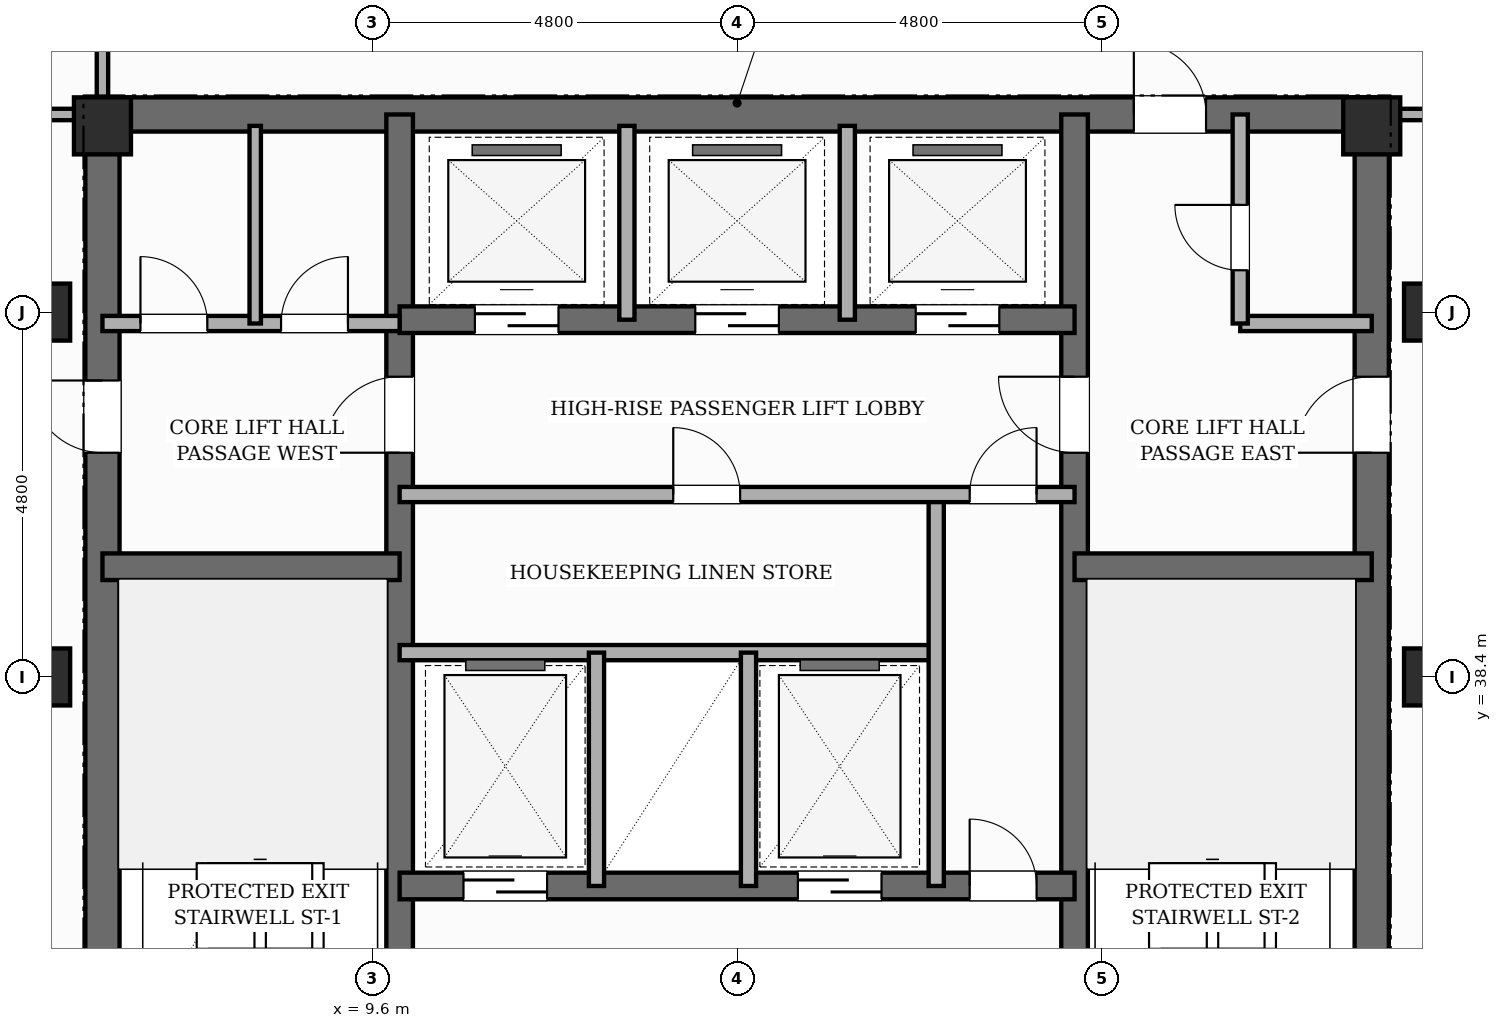
"""IFC4 building model, lengths in metres.
Left out: names, types, materials, properties, quantities, classifications, styles, units other than length and angle.
Written with IfcOpenShell. Run it as: python <this file> out.ifc"""

import sys

from ifc_helpers import new_model, si_unit, direction, frame, frame_2d, origin, origin_2d, place, context, subcontext, project, spatial, rectangle, extrude, element, fill, save


model = new_model("IFC4")
c1 = context("Model", 3, precision=1e-05, world=origin(), true_north=direction((0.0, 1.0)))
c2 = subcontext(c1, "Body", "Model", "MODEL_VIEW")
j1 = project(units=[si_unit("LENGTHUNIT", "METRE"), si_unit("PLANEANGLEUNIT", "RADIAN")], contexts=[c1])
p1 = place(None, origin())
s1 = spatial("IfcSite", under=j1, at=p1, CompositionType="ELEMENT")
p2 = place(p1, origin())
s2 = spatial("IfcBuilding", under=s1, at=p2, CompositionType="ELEMENT")
p3 = place(p2, frame((0.0, 0.0, 265.6)))
s3 = spatial("IfcBuildingStorey", under=s2, at=p3, CompositionType="ELEMENT", Elevation=265.6)
p4 = place(p3, frame((6.05, 30.675, 0.0), z_axis=(0.0, 0.0, 1.0), x_axis=(0.0, 1.0, 0.0)))
e1 = element("IfcWall", 1, at=p4, inside=s3, PredefinedType="SHEAR", context=c2, shape_type="SweptSolid", body=[
    extrude(rectangle(XDim=15.35, YDim=0.45, at=frame_2d((7.675, 0.0))), origin(), (0.0, 0.0, 1.0), 4.3),
])
p5 = place(p4, frame((10.675, 0.0, 0.0)))
e2 = element("IfcOpeningElement", 2, at=p5, cuts=e1, PredefinedType="OPENING", context=c2, shape_type="SweptSolid", body=[
    extrude(rectangle(XDim=0.95, YDim=2.15, at=frame_2d((0.475, 1.075))), frame((0.0, 0.235, 0.0), z_axis=(0.0, -1.0, 0.0), x_axis=(1.0, 0.0, 0.0)), (0.0, 0.0, 1.0), 0.47),
])
p6 = place(p3, frame((22.75, 30.675, 0.0), z_axis=(0.0, 0.0, 1.0), x_axis=(0.0, 1.0, 0.0)))
e3 = element("IfcWall", 3, at=p6, inside=s3, PredefinedType="SHEAR", context=c2, shape_type="SweptSolid", body=[
    extrude(rectangle(XDim=15.35, YDim=0.45, at=frame_2d((7.675, 0.0))), origin(), (0.0, 0.0, 1.0), 4.3),
])
p7 = place(p6, frame((10.675, 0.0, 0.0)))
e4 = element("IfcOpeningElement", 4, at=p7, cuts=e3, PredefinedType="OPENING", context=c2, shape_type="SweptSolid", body=[
    extrude(rectangle(XDim=1.0, YDim=2.15, at=frame_2d((0.5, 1.075))), frame((0.0, 0.235, 0.0), z_axis=(0.0, -1.0, 0.0), x_axis=(1.0, 0.0, 0.0)), (0.0, 0.0, 1.0), 0.47),
])
p8 = place(p3, frame((6.05, 45.8, 0.0), z_axis=(0.0, 0.0, 1.0), x_axis=(1.0, 0.0, 0.0)))
e5 = element("IfcWall", 5, at=p8, inside=s3, PredefinedType="SHEAR", context=c2, shape_type="SweptSolid", body=[
    extrude(rectangle(XDim=16.7, YDim=0.45, at=frame_2d((8.35, 0.0))), origin(), (0.0, 0.0, 1.0), 4.3),
])
p9 = place(p8, frame((13.57, 0.0, 0.0)))
e6 = element("IfcOpeningElement", 6, at=p9, cuts=e5, PredefinedType="OPENING", context=c2, shape_type="SweptSolid", body=[
    extrude(rectangle(XDim=0.95, YDim=2.15, at=frame_2d((0.475, 1.075))), frame((0.0, 0.235, 0.0), z_axis=(0.0, -1.0, 0.0), x_axis=(1.0, 0.0, 0.0)), (0.0, 0.0, 1.0), 0.47),
])
p10 = place(p3, frame((9.96, 30.9, 0.0), z_axis=(0.0, 0.0, 1.0), x_axis=(0.0, 1.0, 0.0)))
e7 = element("IfcWall", 7, at=p10, inside=s3, PredefinedType="SHEAR", context=c2, shape_type="SweptSolid", body=[
    extrude(rectangle(XDim=14.9, YDim=0.35, at=frame_2d((7.45, 0.0))), origin(), (0.0, 0.0, 1.0), 4.3),
])
p11 = place(p10, frame((0.65, 0.0, 0.0)))
e8 = element("IfcOpeningElement", 8, at=p11, cuts=e7, PredefinedType="OPENING", context=c2, shape_type="SweptSolid", body=[
    extrude(rectangle(XDim=0.95, YDim=2.1, at=frame_2d((0.475, 1.05))), frame((0.0, 0.185, 0.0), z_axis=(0.0, -1.0, 0.0), x_axis=(1.0, 0.0, 0.0)), (0.0, 0.0, 1.0), 0.37),
])
p12 = place(p10, frame((10.45, 0.0, 0.0)))
e9 = element("IfcOpeningElement", 9, at=p12, cuts=e7, PredefinedType="OPENING", context=c2, shape_type="SweptSolid", body=[
    extrude(rectangle(XDim=1.0, YDim=2.15, at=frame_2d((0.5, 1.075))), frame((0.0, 0.185, 0.0), z_axis=(0.0, -1.0, 0.0), x_axis=(1.0, 0.0, 0.0)), (0.0, 0.0, 1.0), 0.37),
])
p13 = place(p3, frame((18.84, 30.9, 0.0), z_axis=(0.0, 0.0, 1.0), x_axis=(0.0, 1.0, 0.0)))
e10 = element("IfcWall", 10, at=p13, inside=s3, PredefinedType="SHEAR", context=c2, shape_type="SweptSolid", body=[
    extrude(rectangle(XDim=14.9, YDim=0.35, at=frame_2d((7.45, 0.0))), origin(), (0.0, 0.0, 1.0), 4.3),
])
p14 = place(p13, frame((0.65, 0.0, 0.0)))
e11 = element("IfcOpeningElement", 11, at=p14, cuts=e10, PredefinedType="OPENING", context=c2, shape_type="SweptSolid", body=[
    extrude(rectangle(XDim=0.95, YDim=2.1, at=frame_2d((0.475, 1.05))), frame((0.0, 0.185, 0.0), z_axis=(0.0, -1.0, 0.0), x_axis=(1.0, 0.0, 0.0)), (0.0, 0.0, 1.0), 0.37),
])
p15 = place(p13, frame((10.45, 0.0, 0.0)))
e12 = element("IfcOpeningElement", 12, at=p15, cuts=e10, PredefinedType="OPENING", context=c2, shape_type="SweptSolid", body=[
    extrude(rectangle(XDim=1.0, YDim=2.15, at=frame_2d((0.5, 1.075))), frame((0.0, 0.185, 0.0), z_axis=(0.0, -1.0, 0.0), x_axis=(1.0, 0.0, 0.0)), (0.0, 0.0, 1.0), 0.37),
])
for number, where, z_axis, x_axis in (
    (13, (6.05, 39.85, 0.0), (0.0, 0.0, 1.0), (1.0, 0.0, 0.0)),
    (14, (18.84, 39.85, 0.0), (0.0, 0.0, 1.0), (1.0, 0.0, 0.0)),
):
    element("IfcWall", number, at=place(p3, frame(where, z_axis=z_axis, x_axis=x_axis)), inside=s3, PredefinedType="SHEAR", context=c2, shape_type="SweptSolid", body=[
        extrude(rectangle(XDim=3.91, YDim=0.35, at=frame_2d((1.955, 0.0))), origin(), (0.0, 0.0, 1.0), 4.3),
    ])
p16 = place(p3, frame((9.96, 35.65, 0.0), z_axis=(0.0, 0.0, 1.0), x_axis=(1.0, 0.0, 0.0)))
e15 = element("IfcWall", 15, at=p16, inside=s3, PredefinedType="SHEAR", context=c2, shape_type="SweptSolid", body=[
    extrude(rectangle(XDim=8.88, YDim=0.35, at=frame_2d((4.44, 0.0))), origin(), (0.0, 0.0, 1.0), 4.3),
])
p17 = place(p16, frame((0.84, 0.0, 0.0)))
e16 = element("IfcOpeningElement", 16, at=p17, cuts=e15, PredefinedType="OPENING", context=c2, shape_type="SweptSolid", body=[
    extrude(rectangle(XDim=1.1, YDim=2.15, at=frame_2d((0.55, 1.075))), frame((0.0, 0.185, 0.0), z_axis=(0.0, -1.0, 0.0), x_axis=(1.0, 0.0, 0.0)), (0.0, 0.0, 1.0), 0.37),
])
p18 = place(p16, frame((5.24, 0.0, 0.0)))
e17 = element("IfcOpeningElement", 17, at=p18, cuts=e15, PredefinedType="OPENING", context=c2, shape_type="SweptSolid", body=[
    extrude(rectangle(XDim=1.1, YDim=2.15, at=frame_2d((0.55, 1.075))), frame((0.0, 0.185, 0.0), z_axis=(0.0, -1.0, 0.0), x_axis=(1.0, 0.0, 0.0)), (0.0, 0.0, 1.0), 0.37),
])
p19 = place(p16, frame((7.5, 0.0, 0.0)))
e18 = element("IfcOpeningElement", 18, at=p19, cuts=e15, PredefinedType="OPENING", context=c2, shape_type="SweptSolid", body=[
    extrude(rectangle(XDim=0.88, YDim=2.1, at=frame_2d((0.44, 1.05))), frame((0.0, 0.185, 0.0), z_axis=(0.0, -1.0, 0.0), x_axis=(1.0, 0.0, 0.0)), (0.0, 0.0, 1.0), 0.37),
])
p20 = place(p3, frame((9.96, 43.1, 0.0), z_axis=(0.0, 0.0, 1.0), x_axis=(1.0, 0.0, 0.0)))
e19 = element("IfcWall", 19, at=p20, inside=s3, PredefinedType="SHEAR", context=c2, shape_type="SweptSolid", body=[
    extrude(rectangle(XDim=8.88, YDim=0.35, at=frame_2d((4.44, 0.0))), origin(), (0.0, 0.0, 1.0), 4.3),
])
p21 = place(p20, frame((0.99, 0.0, 0.0)))
e20 = element("IfcOpeningElement", 20, at=p21, cuts=e19, PredefinedType="OPENING", context=c2, shape_type="SweptSolid", body=[
    extrude(rectangle(XDim=1.1, YDim=2.15, at=frame_2d((0.55, 1.075))), frame((0.0, 0.185, 0.0), z_axis=(0.0, -1.0, 0.0), x_axis=(1.0, 0.0, 0.0)), (0.0, 0.0, 1.0), 0.37),
])
p22 = place(p20, frame((3.89, 0.0, 0.0)))
e21 = element("IfcOpeningElement", 21, at=p22, cuts=e19, PredefinedType="OPENING", context=c2, shape_type="SweptSolid", body=[
    extrude(rectangle(XDim=1.1, YDim=2.15, at=frame_2d((0.55, 1.075))), frame((0.0, 0.185, 0.0), z_axis=(0.0, -1.0, 0.0), x_axis=(1.0, 0.0, 0.0)), (0.0, 0.0, 1.0), 0.37),
])
p23 = place(p20, frame((6.79, 0.0, 0.0)))
e22 = element("IfcOpeningElement", 22, at=p23, cuts=e19, PredefinedType="OPENING", context=c2, shape_type="SweptSolid", body=[
    extrude(rectangle(XDim=1.1, YDim=2.15, at=frame_2d((0.55, 1.075))), frame((0.0, 0.185, 0.0), z_axis=(0.0, -1.0, 0.0), x_axis=(1.0, 0.0, 0.0)), (0.0, 0.0, 1.0), 0.37),
])
for number, where, z_axis, x_axis in (
    (23, (5.25, 38.4, 0.0), (0.0, 0.0, 1.0), (1.0, 0.0, 0.0)),
    (24, (5.25, 43.2, 0.0), (0.0, 0.0, 1.0), (1.0, 0.0, 0.0)),
    (25, (6.05, 45.65, 0.0), (0.0, 0.0, 1.0), (1.0, 0.0, 0.0)),
    (26, (22.75, 45.65, 0.0), (0.0, 0.0, 1.0), (1.0, 0.0, 0.0)),
    (27, (23.55, 38.4, 0.0), (0.0, 0.0, 1.0), (1.0, 0.0, 0.0)),
    (28, (23.55, 43.2, 0.0), (0.0, 0.0, 1.0), (1.0, 0.0, 0.0)),
):
    element("IfcColumn", number, at=place(p3, frame(where, z_axis=z_axis, x_axis=x_axis)), inside=s3, PredefinedType="COLUMN", context=c2, shape_type="SweptSolid", body=[
        extrude(rectangle(XDim=0.75, YDim=0.75, at=origin_2d()), origin(), (0.0, 0.0, 1.0), 4.3),
    ])
p24 = place(p3, frame((9.96, 38.72, 0.0), z_axis=(0.0, 0.0, 1.0), x_axis=(1.0, 0.0, 0.0)))
e29 = element("IfcWall", 29, at=p24, inside=s3, PredefinedType="POLYGONAL", context=c2, shape_type="SweptSolid", body=[
    extrude(rectangle(XDim=7.06, YDim=0.2, at=frame_2d((3.53, 0.0))), origin(), (0.0, 0.0, 1.0), 4.04),
])
for number, where, z_axis, x_axis in (
    (30, (12.55, 35.65, 0.0), (0.0, 0.0, 1.0), (0.0, 1.0, 0.0)),
    (31, (14.55, 35.65, 0.0), (0.0, 0.0, 1.0), (0.0, 1.0, 0.0)),
):
    element("IfcWall", number, at=place(p3, frame(where, z_axis=z_axis, x_axis=x_axis)), inside=s3, PredefinedType="POLYGONAL", context=c2, shape_type="SweptSolid", body=[
        extrude(rectangle(XDim=3.07, YDim=0.2, at=frame_2d((1.535, 0.0))), origin(), (0.0, 0.0, 1.0), 4.04),
    ])
p25 = place(p3, frame((17.02, 35.65, 0.0), z_axis=(0.0, 0.0, 1.0), x_axis=(0.0, 1.0, 0.0)))
e32 = element("IfcWall", 32, at=p25, inside=s3, PredefinedType="POLYGONAL", context=c2, shape_type="SweptSolid", body=[
    extrude(rectangle(XDim=5.15, YDim=0.2, at=frame_2d((2.575, 0.0))), origin(), (0.0, 0.0, 1.0), 4.04),
])
p26 = place(p3, frame((9.96, 40.8, 0.0), z_axis=(0.0, 0.0, 1.0), x_axis=(1.0, 0.0, 0.0)))
e33 = element("IfcWall", 33, at=p26, inside=s3, PredefinedType="POLYGONAL", context=c2, shape_type="SweptSolid", body=[
    extrude(rectangle(XDim=8.88, YDim=0.2, at=frame_2d((4.44, 0.0))), origin(), (0.0, 0.0, 1.0), 4.04),
])
p27 = place(p26, frame((7.5, 0.0, 0.0)))
e34 = element("IfcOpeningElement", 34, at=p27, cuts=e33, PredefinedType="OPENING", context=c2, shape_type="SweptSolid", body=[
    extrude(rectangle(XDim=0.88, YDim=2.1, at=frame_2d((0.44, 1.05))), frame((0.0, 0.11, 0.0), z_axis=(0.0, -1.0, 0.0), x_axis=(1.0, 0.0, 0.0)), (0.0, 0.0, 1.0), 0.22),
])
p28 = place(p26, frame((3.6, 0.0, 0.0)))
e35 = element("IfcOpeningElement", 35, at=p28, cuts=e33, PredefinedType="OPENING", context=c2, shape_type="SweptSolid", body=[
    extrude(rectangle(XDim=0.88, YDim=2.1, at=frame_2d((0.44, 1.05))), frame((0.0, 0.11, 0.0), z_axis=(0.0, -1.0, 0.0), x_axis=(1.0, 0.0, 0.0)), (0.0, 0.0, 1.0), 0.22),
])
p29 = place(p3, frame((21.02, 43.05, 0.0), z_axis=(0.0, 0.0, 1.0), x_axis=(1.0, 0.0, 0.0)))
e36 = element("IfcWall", 36, at=p29, inside=s3, PredefinedType="POLYGONAL", context=c2, shape_type="SweptSolid", body=[
    extrude(rectangle(XDim=1.73, YDim=0.2, at=frame_2d((0.865, 0.0))), origin(), (0.0, 0.0, 1.0), 3.32),
])
p30 = place(p3, frame((21.02, 43.05, 0.0), z_axis=(0.0, 0.0, 1.0), x_axis=(0.0, 1.0, 0.0)))
e37 = element("IfcWall", 37, at=p30, inside=s3, PredefinedType="POLYGONAL", context=c2, shape_type="SweptSolid", body=[
    extrude(rectangle(XDim=2.75, YDim=0.2, at=frame_2d((1.375, 0.0))), origin(), (0.0, 0.0, 1.0), 4.04),
])
p31 = place(p30, frame((0.7, 0.0, 0.0)))
e38 = element("IfcOpeningElement", 38, at=p31, cuts=e37, PredefinedType="OPENING", context=c2, shape_type="SweptSolid", body=[
    extrude(rectangle(XDim=0.86, YDim=2.1, at=frame_2d((0.43, 1.05))), frame((0.0, 0.11, 0.0), z_axis=(0.0, -1.0, 0.0), x_axis=(1.0, 0.0, 0.0)), (0.0, 0.0, 1.0), 0.22),
])
p32 = place(p3, frame((6.05, 43.05, 0.0), z_axis=(0.0, 0.0, 1.0), x_axis=(1.0, 0.0, 0.0)))
e39 = element("IfcWall", 39, at=p32, inside=s3, PredefinedType="POLYGONAL", context=c2, shape_type="SweptSolid", body=[
    extrude(rectangle(XDim=3.91, YDim=0.2, at=frame_2d((1.955, 0.0))), origin(), (0.0, 0.0, 1.0), 3.32),
])
p33 = place(p32, frame((0.5, 0.0, 0.0)))
e40 = element("IfcOpeningElement", 40, at=p33, cuts=e39, PredefinedType="OPENING", context=c2, shape_type="SweptSolid", body=[
    extrude(rectangle(XDim=0.88, YDim=2.1, at=frame_2d((0.44, 1.05))), frame((0.0, 0.11, 0.0), z_axis=(0.0, -1.0, 0.0), x_axis=(1.0, 0.0, 0.0)), (0.0, 0.0, 1.0), 0.22),
])
p34 = place(p32, frame((2.35, 0.0, 0.0)))
e41 = element("IfcOpeningElement", 41, at=p34, cuts=e39, PredefinedType="OPENING", context=c2, shape_type="SweptSolid", body=[
    extrude(rectangle(XDim=0.88, YDim=2.1, at=frame_2d((0.44, 1.05))), frame((0.0, 0.11, 0.0), z_axis=(0.0, -1.0, 0.0), x_axis=(1.0, 0.0, 0.0)), (0.0, 0.0, 1.0), 0.22),
])
for number, where, z_axis, x_axis in (
    (42, (12.95, 43.1, 0.0), (0.0, 0.0, 1.0), (0.0, 1.0, 0.0)),
    (43, (15.85, 43.1, 0.0), (0.0, 0.0, 1.0), (0.0, 1.0, 0.0)),
):
    element("IfcWall", number, at=place(p3, frame(where, z_axis=z_axis, x_axis=x_axis)), inside=s3, PredefinedType="POLYGONAL", context=c2, shape_type="SweptSolid", body=[
        extrude(rectangle(XDim=2.55, YDim=0.2, at=frame_2d((1.275, 0.0))), origin(), (0.0, 0.0, 1.0), 4.04),
    ])
p35 = place(p3, frame((8.06, 43.05, 0.0), z_axis=(0.0, 0.0, 1.0), x_axis=(0.0, 1.0, 0.0)))
e44 = element("IfcWall", 44, at=p35, inside=s3, PredefinedType="PARTITIONING", context=c2, shape_type="SweptSolid", body=[
    extrude(rectangle(XDim=2.6, YDim=0.15, at=frame_2d((1.3, 0.0))), origin(), (0.0, 0.0, 1.0), 4.04),
])
p36 = place(p3, frame((5.12, 45.8, 0.0), z_axis=(0.0, 0.0, 1.0), x_axis=(1.0, 0.0, 0.0)))
e45 = element("IfcWall", 45, at=p36, inside=s3, PredefinedType="PARTITIONING", context=c2, shape_type="SweptSolid", body=[
    extrude(rectangle(XDim=0.93, YDim=0.15, at=frame_2d((0.465, 0.0))), origin(), (0.0, 0.0, 1.0), 4.04),
])
p37 = place(p3, frame((6.05, 45.8, 0.0), z_axis=(0.0, 0.0, 1.0), x_axis=(0.0, 1.0, 0.0)))
e46 = element("IfcWall", 46, at=p37, inside=s3, PredefinedType="PARTITIONING", context=c2, shape_type="SweptSolid", body=[
    extrude(rectangle(XDim=1.5, YDim=0.15, at=frame_2d((0.75, 0.0))), origin(), (0.0, 0.0, 1.0), 4.04),
])
p38 = place(p3, frame((22.75, 45.8, 0.0), z_axis=(0.0, 0.0, 1.0), x_axis=(1.0, 0.0, 0.0)))
e47 = element("IfcWall", 47, at=p38, inside=s3, PredefinedType="PARTITIONING", context=c2, shape_type="SweptSolid", body=[
    extrude(rectangle(XDim=0.93, YDim=0.15, at=frame_2d((0.465, 0.0))), origin(), (0.0, 0.0, 1.0), 4.04),
])
p39 = place(p17, origin())
e48 = element("IfcDoor", 48, at=p39, inside=s3, OperationType="SLIDING_TO_LEFT", PredefinedType="DOOR", context=c2, shape_type="SweptSolid", body=[
    extrude(rectangle(XDim=1.1, YDim=2.15, at=frame_2d((0.55, 1.075))), frame((0.0, 0.025, 0.0), z_axis=(0.0, -1.0, 0.0), x_axis=(1.0, 0.0, 0.0)), (0.0, 0.0, 1.0), 0.05),
])
fill(e16, e48)
p40 = place(p18, origin())
e49 = element("IfcDoor", 49, at=p40, inside=s3, OperationType="SLIDING_TO_RIGHT", PredefinedType="DOOR", context=c2, shape_type="SweptSolid", body=[
    extrude(rectangle(XDim=1.1, YDim=2.15, at=frame_2d((0.55, 1.075))), frame((0.0, 0.025, 0.0), z_axis=(0.0, -1.0, 0.0), x_axis=(1.0, 0.0, 0.0)), (0.0, 0.0, 1.0), 0.05),
])
fill(e17, e49)
p41 = place(p19, origin())
e50 = element("IfcDoor", 50, at=p41, inside=s3, OperationType="SINGLE_SWING_LEFT", PredefinedType="DOOR", context=c2, shape_type="SweptSolid", body=[
    extrude(rectangle(XDim=0.88, YDim=2.1, at=frame_2d((0.44, 1.05))), frame((0.0, 0.025, 0.0), z_axis=(0.0, -1.0, 0.0), x_axis=(1.0, 0.0, 0.0)), (0.0, 0.0, 1.0), 0.05),
])
fill(e18, e50)
p42 = place(p27, origin())
e51 = element("IfcDoor", 51, at=p42, inside=s3, OperationType="SINGLE_SWING_RIGHT", PredefinedType="DOOR", context=c2, shape_type="SweptSolid", body=[
    extrude(rectangle(XDim=0.88, YDim=2.1, at=frame_2d((0.44, 1.05))), frame((0.0, 0.025, 0.0), z_axis=(0.0, -1.0, 0.0), x_axis=(1.0, 0.0, 0.0)), (0.0, 0.0, 1.0), 0.05),
])
fill(e34, e51)
p43 = place(p21, origin())
e52 = element("IfcDoor", 52, at=p43, inside=s3, OperationType="SLIDING_TO_LEFT", PredefinedType="DOOR", context=c2, shape_type="SweptSolid", body=[
    extrude(rectangle(XDim=1.1, YDim=2.15, at=frame_2d((0.55, 1.075))), frame((0.0, 0.025, 0.0), z_axis=(0.0, -1.0, 0.0), x_axis=(1.0, 0.0, 0.0)), (0.0, 0.0, 1.0), 0.05),
])
fill(e20, e52)
p44 = place(p22, origin())
e53 = element("IfcDoor", 53, at=p44, inside=s3, OperationType="SLIDING_TO_RIGHT", PredefinedType="DOOR", context=c2, shape_type="SweptSolid", body=[
    extrude(rectangle(XDim=1.1, YDim=2.15, at=frame_2d((0.55, 1.075))), frame((0.0, 0.025, 0.0), z_axis=(0.0, -1.0, 0.0), x_axis=(1.0, 0.0, 0.0)), (0.0, 0.0, 1.0), 0.05),
])
fill(e21, e53)
p45 = place(p23, origin())
e54 = element("IfcDoor", 54, at=p45, inside=s3, OperationType="SLIDING_TO_LEFT", PredefinedType="DOOR", context=c2, shape_type="SweptSolid", body=[
    extrude(rectangle(XDim=1.1, YDim=2.15, at=frame_2d((0.55, 1.075))), frame((0.0, 0.025, 0.0), z_axis=(0.0, -1.0, 0.0), x_axis=(1.0, 0.0, 0.0)), (0.0, 0.0, 1.0), 0.05),
])
fill(e22, e54)
p46 = place(p12, origin())
e55 = element("IfcDoor", 55, at=p46, inside=s3, OperationType="SINGLE_SWING_LEFT", PredefinedType="DOOR", context=c2, shape_type="SweptSolid", body=[
    extrude(rectangle(XDim=1.0, YDim=2.15, at=frame_2d((0.5, 1.075))), frame((0.0, 0.025, 0.0), z_axis=(0.0, -1.0, 0.0), x_axis=(1.0, 0.0, 0.0)), (0.0, 0.0, 1.0), 0.05),
])
fill(e9, e55)
p47 = place(p15, origin())
e56 = element("IfcDoor", 56, at=p47, inside=s3, OperationType="SINGLE_SWING_RIGHT", PredefinedType="DOOR", context=c2, shape_type="SweptSolid", body=[
    extrude(rectangle(XDim=1.0, YDim=2.15, at=frame_2d((0.5, 1.075))), frame((0.0, 0.025, 0.0), z_axis=(0.0, -1.0, 0.0), x_axis=(1.0, 0.0, 0.0)), (0.0, 0.0, 1.0), 0.05),
])
fill(e12, e56)
p48 = place(p7, origin())
e57 = element("IfcDoor", 57, at=p48, inside=s3, OperationType="SINGLE_SWING_LEFT", PredefinedType="DOOR", context=c2, shape_type="SweptSolid", body=[
    extrude(rectangle(XDim=1.0, YDim=2.15, at=frame_2d((0.5, 1.075))), frame((0.0, 0.025, 0.0), z_axis=(0.0, -1.0, 0.0), x_axis=(1.0, 0.0, 0.0)), (0.0, 0.0, 1.0), 0.05),
])
fill(e4, e57)
p49 = place(p9, origin())
e58 = element("IfcDoor", 58, at=p49, inside=s3, OperationType="SINGLE_SWING_LEFT", PredefinedType="DOOR", context=c2, shape_type="SweptSolid", body=[
    extrude(rectangle(XDim=0.95, YDim=2.15, at=frame_2d((0.475, 1.075))), frame((0.0, 0.025, 0.0), z_axis=(0.0, -1.0, 0.0), x_axis=(1.0, 0.0, 0.0)), (0.0, 0.0, 1.0), 0.05),
])
fill(e6, e58)
p50 = place(p5, origin())
e59 = element("IfcDoor", 59, at=p50, inside=s3, OperationType="SINGLE_SWING_RIGHT", PredefinedType="DOOR", context=c2, shape_type="SweptSolid", body=[
    extrude(rectangle(XDim=0.95, YDim=2.15, at=frame_2d((0.475, 1.075))), frame((0.0, 0.025, 0.0), z_axis=(0.0, -1.0, 0.0), x_axis=(1.0, 0.0, 0.0)), (0.0, 0.0, 1.0), 0.05),
])
fill(e2, e59)
p51 = place(p33, origin())
e60 = element("IfcDoor", 60, at=p51, inside=s3, OperationType="SINGLE_SWING_LEFT", PredefinedType="DOOR", context=c2, shape_type="SweptSolid", body=[
    extrude(rectangle(XDim=0.88, YDim=2.1, at=frame_2d((0.44, 1.05))), frame((0.0, 0.025, 0.0), z_axis=(0.0, -1.0, 0.0), x_axis=(1.0, 0.0, 0.0)), (0.0, 0.0, 1.0), 0.05),
])
fill(e40, e60)
p52 = place(p34, origin())
e61 = element("IfcDoor", 61, at=p52, inside=s3, OperationType="SINGLE_SWING_RIGHT", PredefinedType="DOOR", context=c2, shape_type="SweptSolid", body=[
    extrude(rectangle(XDim=0.88, YDim=2.1, at=frame_2d((0.44, 1.05))), frame((0.0, 0.025, 0.0), z_axis=(0.0, -1.0, 0.0), x_axis=(1.0, 0.0, 0.0)), (0.0, 0.0, 1.0), 0.05),
])
fill(e41, e61)
p53 = place(p28, origin())
e62 = element("IfcDoor", 62, at=p53, inside=s3, OperationType="SINGLE_SWING_LEFT", PredefinedType="DOOR", context=c2, shape_type="SweptSolid", body=[
    extrude(rectangle(XDim=0.88, YDim=2.1, at=frame_2d((0.44, 1.05))), frame((0.0, 0.025, 0.0), z_axis=(0.0, -1.0, 0.0), x_axis=(1.0, 0.0, 0.0)), (0.0, 0.0, 1.0), 0.05),
])
fill(e35, e62)
p54 = place(p31, origin())
e63 = element("IfcDoor", 63, at=p54, inside=s3, OperationType="SINGLE_SWING_RIGHT", PredefinedType="DOOR", context=c2, shape_type="SweptSolid", body=[
    extrude(rectangle(XDim=0.86, YDim=2.1, at=frame_2d((0.43, 1.05))), frame((0.0, 0.025, 0.0), z_axis=(0.0, -1.0, 0.0), x_axis=(1.0, 0.0, 0.0)), (0.0, 0.0, 1.0), 0.05),
])
fill(e38, e63)
save(model, sys.argv[1])
